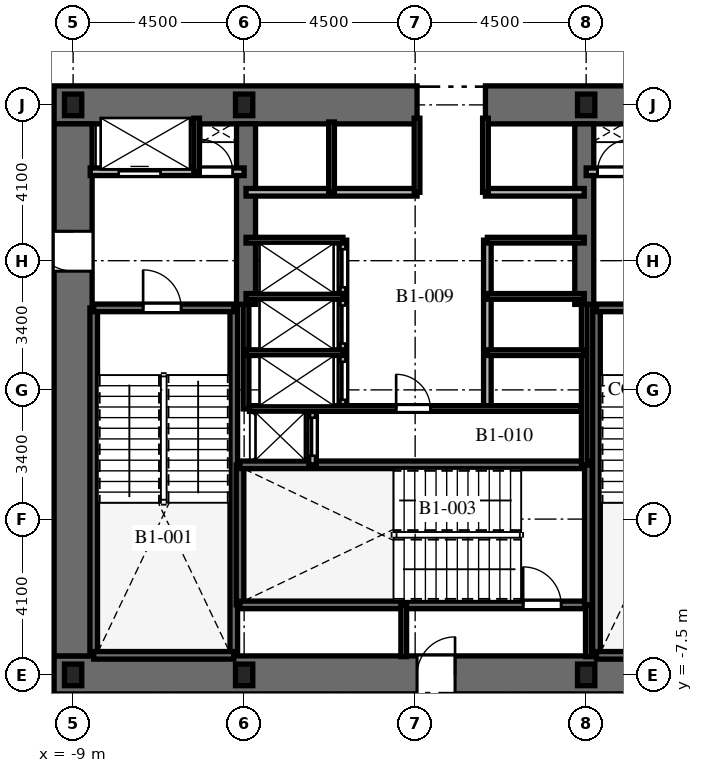
"""IFC4 building model, lengths in metres.
Left out: names, types, materials, properties, quantities, classifications, styles, units other than length and angle.
Written with IfcOpenShell. Run it as: python <this file> out.ifc"""

import sys

from ifc_helpers import new_model, si_unit, direction, frame, frame_2d, origin, origin_2d, place, context, subcontext, project, spatial, rectangle, i_section, extrude, element, fill, save


model = new_model("IFC4")
c1 = context("Model", 3, precision=1e-05, world=origin(), true_north=direction((0.0, 1.0)))
c2 = subcontext(c1, "Body", "Model", "MODEL_VIEW")
j1 = project(units=[si_unit("LENGTHUNIT", "METRE"), si_unit("PLANEANGLEUNIT", "RADIAN")], contexts=[c1])
p1 = place(None, origin())
s1 = spatial("IfcSite", under=j1, at=p1, CompositionType="ELEMENT")
p2 = place(p1, origin())
s2 = spatial("IfcBuilding", under=s1, at=p2, CompositionType="ELEMENT")
p3 = place(p2, frame((0.0, 0.0, -4.5)))
s3 = spatial("IfcBuildingStorey", under=s2, at=p3, CompositionType="ELEMENT", Elevation=-4.5)
p4 = place(p3, frame((-9.5, -7.5, 0.0), z_axis=(0.0, 0.0, 1.0), x_axis=(1.0, 0.0, 0.0)))
e1 = element("IfcWall", 1, at=p4, inside=s3, PredefinedType="SHEAR", context=c2, shape_type="SweptSolid", body=[
    extrude(rectangle(XDim=19.0, YDim=1.0, at=frame_2d((9.5, 0.0))), origin(), (0.0, 0.0, 1.0), 4.5),
])
p5 = place(p4, frame((9.55, 0.0, 0.0)))
e2 = element("IfcOpeningElement", 2, at=p5, cuts=e1, PredefinedType="OPENING", context=c2, shape_type="SweptSolid", body=[
    extrude(rectangle(XDim=1.0, YDim=2.15, at=frame_2d((0.5, 1.075))), frame((0.0, 0.51, 0.0), z_axis=(0.0, -1.0, 0.0), x_axis=(1.0, 0.0, 0.0)), (0.0, 0.0, 1.0), 1.02),
])
p6 = place(p3, frame((-9.5, 7.5, 0.0), z_axis=(0.0, 0.0, 1.0), x_axis=(1.0, 0.0, 0.0)))
e3 = element("IfcWall", 3, at=p6, inside=s3, PredefinedType="SHEAR", context=c2, shape_type="SweptSolid", body=[
    extrude(rectangle(XDim=9.55, YDim=1.0, at=frame_2d((4.775, 0.0))), origin(), (0.0, 0.0, 1.0), 4.5),
])
p7 = place(p3, frame((1.85, 7.5, 0.0), z_axis=(0.0, 0.0, 1.0), x_axis=(1.0, 0.0, 0.0)))
e4 = element("IfcWall", 4, at=p7, inside=s3, PredefinedType="SHEAR", context=c2, shape_type="SweptSolid", body=[
    extrude(rectangle(XDim=7.65, YDim=1.0, at=frame_2d((3.825, 0.0))), origin(), (0.0, 0.0, 1.0), 4.5),
])
p8 = place(p3, frame((-9.0, -7.0, 0.0), z_axis=(0.0, 0.0, 1.0), x_axis=(0.0, 1.0, 0.0)))
e5 = element("IfcWall", 5, at=p8, inside=s3, PredefinedType="SHEAR", context=c2, shape_type="SweptSolid", body=[
    extrude(rectangle(XDim=14.0, YDim=1.0, at=frame_2d((7.0, 0.0))), origin(), (0.0, 0.0, 1.0), 4.5),
])
p9 = place(p8, frame((10.125, 0.0, 0.0)))
e6 = element("IfcOpeningElement", 6, at=p9, cuts=e5, PredefinedType="OPENING", context=c2, shape_type="SweptSolid", body=[
    extrude(rectangle(XDim=1.05, YDim=2.15, at=frame_2d((0.525, 1.075))), frame((0.0, 0.51, 0.0), z_axis=(0.0, -1.0, 0.0), x_axis=(1.0, 0.0, 0.0)), (0.0, 0.0, 1.0), 1.02),
])
for number, where, z_axis, x_axis in (
    (7, (-4.45, 2.25, 0.0), (0.0, 0.0, 1.0), (0.0, 1.0, 0.0)),
    (8, (4.45, 2.25, 0.0), (0.0, 0.0, 1.0), (0.0, 1.0, 0.0)),
):
    element("IfcWall", number, at=place(p3, frame(where, z_axis=z_axis, x_axis=x_axis)), inside=s3, PredefinedType="SHEAR", context=c2, shape_type="SweptSolid", body=[
        extrude(rectangle(XDim=4.75, YDim=0.5, at=frame_2d((2.375, 0.0))), origin(), (0.0, 0.0, 1.0), 4.5),
    ])
for number, where, z_axis, x_axis in (
    (9, (-8.458, -6.985, 0.0), (0.0, 0.0, 1.0), (0.0, 1.0, 0.0)),
    (10, (-4.772, -6.985, 0.0), (0.0, 0.0, 1.0), (0.0, 1.0, 0.0)),
):
    element("IfcWall", number, at=place(p3, frame(where, z_axis=z_axis, x_axis=x_axis)), inside=s3, PredefinedType="SHEAR", context=c2, shape_type="SweptSolid", body=[
        extrude(rectangle(XDim=9.143, YDim=0.2, at=frame_2d((4.572, 0.0))), origin(), (0.0, 0.0, 1.0), 4.5),
    ])
p10 = place(p3, frame((-8.458, -6.985, 0.0), z_axis=(0.0, 0.0, 1.0), x_axis=(1.0, 0.0, 0.0)))
e11 = element("IfcWall", 11, at=p10, inside=s3, PredefinedType="SHEAR", context=c2, shape_type="SweptSolid", body=[
    extrude(rectangle(XDim=3.686, YDim=0.2, at=frame_2d((1.843, 0.0))), origin(), (0.0, 0.0, 1.0), 4.5),
])
p11 = place(p3, frame((-8.458, 2.158, 0.0), z_axis=(0.0, 0.0, 1.0), x_axis=(1.0, 0.0, 0.0)))
e12 = element("IfcWall", 12, at=p11, inside=s3, PredefinedType="SHEAR", context=c2, shape_type="SweptSolid", body=[
    extrude(rectangle(XDim=3.686, YDim=0.2, at=frame_2d((1.843, 0.0))), origin(), (0.0, 0.0, 1.0), 4.5),
])
p12 = place(p11, frame((1.3, 0.0, 0.0)))
e13 = element("IfcOpeningElement", 13, at=p12, cuts=e12, PredefinedType="OPENING", context=c2, shape_type="SweptSolid", body=[
    extrude(rectangle(XDim=1.0, YDim=2.15, at=frame_2d((0.5, 1.075))), frame((0.0, 0.11, 0.0), z_axis=(0.0, -1.0, 0.0), x_axis=(1.0, 0.0, 0.0)), (0.0, 0.0, 1.0), 0.22),
])
p13 = place(p3, frame((4.772, -6.985, 0.0), z_axis=(0.0, 0.0, 1.0), x_axis=(0.0, 1.0, 0.0)))
e14 = element("IfcWall", 14, at=p13, inside=s3, PredefinedType="SHEAR", context=c2, shape_type="SweptSolid", body=[
    extrude(rectangle(XDim=9.143, YDim=0.2, at=frame_2d((4.572, 0.0))), origin(), (0.0, 0.0, 1.0), 4.5),
])
p14 = place(p3, frame((4.772, -6.985, 0.0), z_axis=(0.0, 0.0, 1.0), x_axis=(1.0, 0.0, 0.0)))
e15 = element("IfcWall", 15, at=p14, inside=s3, PredefinedType="SHEAR", context=c2, shape_type="SweptSolid", body=[
    extrude(rectangle(XDim=3.686, YDim=0.2, at=frame_2d((1.843, 0.0))), origin(), (0.0, 0.0, 1.0), 4.5),
])
p15 = place(p3, frame((4.772, 2.158, 0.0), z_axis=(0.0, 0.0, 1.0), x_axis=(1.0, 0.0, 0.0)))
e16 = element("IfcWall", 16, at=p15, inside=s3, PredefinedType="SHEAR", context=c2, shape_type="SweptSolid", body=[
    extrude(rectangle(XDim=3.686, YDim=0.2, at=frame_2d((1.843, 0.0))), origin(), (0.0, 0.0, 1.0), 4.5),
])
p16 = place(p15, frame((1.35, 0.0, 0.0)))
e17 = element("IfcOpeningElement", 17, at=p16, cuts=e16, PredefinedType="OPENING", context=c2, shape_type="SweptSolid", body=[
    extrude(rectangle(XDim=1.0, YDim=2.15, at=frame_2d((0.5, 1.075))), frame((0.0, 0.11, 0.0), z_axis=(0.0, -1.0, 0.0), x_axis=(1.0, 0.0, 0.0)), (0.0, 0.0, 1.0), 0.22),
])
p17 = place(p3, frame((-4.608, -5.658, 0.0), z_axis=(0.0, 0.0, 1.0), x_axis=(0.0, 1.0, 0.0)))
e18 = element("IfcWall", 18, at=p17, inside=s3, PredefinedType="SHEAR", context=c2, shape_type="SweptSolid", body=[
    extrude(rectangle(XDim=3.686, YDim=0.2, at=frame_2d((1.843, 0.0))), origin(), (0.0, 0.0, 1.0), 4.5),
])
p18 = place(p3, frame((-4.608, -5.658, 0.0), z_axis=(0.0, 0.0, 1.0), x_axis=(1.0, 0.0, 0.0)))
e19 = element("IfcWall", 19, at=p18, inside=s3, PredefinedType="SHEAR", context=c2, shape_type="SweptSolid", body=[
    extrude(rectangle(XDim=9.166, YDim=0.2, at=frame_2d((4.583, 0.0))), origin(), (0.0, 0.0, 1.0), 4.5),
])
p19 = place(p18, frame((7.45, 0.0, 0.0)))
e20 = element("IfcOpeningElement", 20, at=p19, cuts=e19, PredefinedType="OPENING", context=c2, shape_type="SweptSolid", body=[
    extrude(rectangle(XDim=1.0, YDim=2.15, at=frame_2d((0.5, 1.075))), frame((0.0, 0.11, 0.0), z_axis=(0.0, -1.0, 0.0), x_axis=(1.0, 0.0, 0.0)), (0.0, 0.0, 1.0), 0.22),
])
p20 = place(p3, frame((-4.608, -1.972, 0.0), z_axis=(0.0, 0.0, 1.0), x_axis=(1.0, 0.0, 0.0)))
e21 = element("IfcWall", 21, at=p20, inside=s3, PredefinedType="SHEAR", context=c2, shape_type="SweptSolid", body=[
    extrude(rectangle(XDim=9.166, YDim=0.2, at=frame_2d((4.583, 0.0))), origin(), (0.0, 0.0, 1.0), 4.5),
])
p21 = place(p3, frame((4.558, -5.658, 0.0), z_axis=(0.0, 0.0, 1.0), x_axis=(0.0, 1.0, 0.0)))
e22 = element("IfcWall", 22, at=p21, inside=s3, PredefinedType="SHEAR", context=c2, shape_type="SweptSolid", body=[
    extrude(rectangle(XDim=3.686, YDim=0.2, at=frame_2d((1.843, 0.0))), origin(), (0.0, 0.0, 1.0), 4.5),
])
for number, where, z_axis, x_axis in (
    (23, (-9.0, -7.5, 0.0), (0.0, 0.0, 1.0), (1.0, 0.0, 0.0)),
    (24, (-4.5, -7.5, 0.0), (0.0, 0.0, 1.0), (1.0, 0.0, 0.0)),
    (25, (4.5, -7.5, 0.0), (0.0, 0.0, 1.0), (1.0, 0.0, 0.0)),
    (26, (4.5, 7.5, 0.0), (0.0, 0.0, 1.0), (1.0, 0.0, 0.0)),
    (27, (-4.5, 7.5, 0.0), (0.0, 0.0, 1.0), (1.0, 0.0, 0.0)),
    (28, (-9.0, 7.5, 0.0), (0.0, 0.0, 1.0), (1.0, 0.0, 0.0)),
):
    element("IfcColumn", number, at=place(p3, frame(where, z_axis=z_axis, x_axis=x_axis)), inside=s3, PredefinedType="COLUMN", context=c2, shape_type="SweptSolid", body=[
        extrude(i_section(OverallWidth=0.454, OverallDepth=0.569, WebThickness=0.078, FlangeThickness=0.125, at=origin_2d()), origin(), (0.0, 0.0, 1.0), 4.5),
    ])
for number, where, z_axis, x_axis in (
    (29, (-0.3, -7.02, 0.0), (0.0, 0.0, 1.0), (0.0, 1.0, 0.0)),
    (30, (4.558, -7.02, 0.0), (0.0, 0.0, 1.0), (0.0, 1.0, 0.0)),
):
    element("IfcWall", number, at=place(p3, frame(where, z_axis=z_axis, x_axis=x_axis)), inside=s3, PredefinedType="PARTITIONING", context=c2, shape_type="SweptSolid", body=[
        extrude(rectangle(XDim=1.362, YDim=0.15, at=frame_2d((0.681, 0.0))), origin(), (0.0, 0.0, 1.0), 4.18),
    ])
p22 = place(p3, frame((-8.55, 5.74, 0.0), z_axis=(0.0, 0.0, 1.0), x_axis=(1.0, 0.0, 0.0)))
e31 = element("IfcWall", 31, at=p22, inside=s3, PredefinedType="PARTITIONING", context=c2, shape_type="SweptSolid", body=[
    extrude(rectangle(XDim=4.05, YDim=0.2, at=frame_2d((2.025, 0.0))), origin(), (0.0, 0.0, 1.0), 4.18),
])
p23 = place(p22, frame((0.75, 0.0, 0.0)))
e32 = element("IfcOpeningElement", 32, at=p23, cuts=e31, PredefinedType="OPENING", context=c2, shape_type="SweptSolid", body=[
    extrude(rectangle(XDim=1.1, YDim=2.2, at=frame_2d((0.55, 1.1))), frame((0.0, 0.11, 0.0), z_axis=(0.0, -1.0, 0.0), x_axis=(1.0, 0.0, 0.0)), (0.0, 0.0, 1.0), 0.22),
])
p24 = place(p22, frame((2.9, 0.0, 0.0)))
e33 = element("IfcOpeningElement", 33, at=p24, cuts=e31, PredefinedType="OPENING", context=c2, shape_type="SweptSolid", body=[
    extrude(rectangle(XDim=0.85, YDim=2.03, at=frame_2d((0.425, 1.015))), frame((0.0, 0.11, 0.0), z_axis=(0.0, -1.0, 0.0), x_axis=(1.0, 0.0, 0.0)), (0.0, 0.0, 1.0), 0.22),
])
p25 = place(p3, frame((-5.75, 5.74, 0.0), z_axis=(0.0, 0.0, 1.0), x_axis=(0.0, 1.0, 0.0)))
e34 = element("IfcWall", 34, at=p25, inside=s3, PredefinedType="PARTITIONING", context=c2, shape_type="SweptSolid", body=[
    extrude(rectangle(XDim=1.41, YDim=0.15, at=frame_2d((0.705, 0.0))), origin(), (0.0, 0.0, 1.0), 4.18),
])
p26 = place(p3, frame((4.5, 5.74, 0.0), z_axis=(0.0, 0.0, 1.0), x_axis=(1.0, 0.0, 0.0)))
e35 = element("IfcWall", 35, at=p26, inside=s3, PredefinedType="PARTITIONING", context=c2, shape_type="SweptSolid", body=[
    extrude(rectangle(XDim=4.05, YDim=0.2, at=frame_2d((2.025, 0.0))), origin(), (0.0, 0.0, 1.0), 4.18),
])
p27 = place(p26, frame((0.3, 0.0, 0.0)))
e36 = element("IfcOpeningElement", 36, at=p27, cuts=e35, PredefinedType="OPENING", context=c2, shape_type="SweptSolid", body=[
    extrude(rectangle(XDim=0.85, YDim=2.03, at=frame_2d((0.425, 1.015))), frame((0.0, 0.11, 0.0), z_axis=(0.0, -1.0, 0.0), x_axis=(1.0, 0.0, 0.0)), (0.0, 0.0, 1.0), 0.22),
])
p28 = place(p26, frame((2.15, 0.0, 0.0)))
e37 = element("IfcOpeningElement", 37, at=p28, cuts=e35, PredefinedType="OPENING", context=c2, shape_type="SweptSolid", body=[
    extrude(rectangle(XDim=1.1, YDim=2.2, at=frame_2d((0.55, 1.1))), frame((0.0, 0.11, 0.0), z_axis=(0.0, -1.0, 0.0), x_axis=(1.0, 0.0, 0.0)), (0.0, 0.0, 1.0), 0.22),
])
p29 = place(p3, frame((-2.7, -1.972, 0.0), z_axis=(0.0, 0.0, 1.0), x_axis=(0.0, 1.0, 0.0)))
e38 = element("IfcWall", 38, at=p29, inside=s3, PredefinedType="PARTITIONING", context=c2, shape_type="SweptSolid", body=[
    extrude(rectangle(XDim=1.472, YDim=0.2, at=frame_2d((0.736, 0.0))), origin(), (0.0, 0.0, 1.0), 4.18),
])
p30 = place(p29, frame((0.24, 0.0, 0.0)))
e39 = element("IfcOpeningElement", 39, at=p30, cuts=e38, PredefinedType="OPENING", context=c2, shape_type="SweptSolid", body=[
    extrude(rectangle(XDim=1.0, YDim=2.2, at=frame_2d((0.5, 1.1))), frame((0.0, 0.11, 0.0), z_axis=(0.0, -1.0, 0.0), x_axis=(1.0, 0.0, 0.0)), (0.0, 0.0, 1.0), 0.22),
])
p31 = place(p3, frame((-4.45, 5.2, 0.0), z_axis=(0.0, 0.0, 1.0), x_axis=(1.0, 0.0, 0.0)))
e40 = element("IfcWall", 40, at=p31, inside=s3, PredefinedType="PARTITIONING", context=c2, shape_type="SweptSolid", body=[
    extrude(rectangle(XDim=4.5, YDim=0.2, at=frame_2d((2.25, 0.0))), origin(), (0.0, 0.0, 1.0), 4.18),
])
p32 = place(p3, frame((1.85, 5.2, 0.0), z_axis=(0.0, 0.0, 1.0), x_axis=(1.0, 0.0, 0.0)))
e41 = element("IfcWall", 41, at=p32, inside=s3, PredefinedType="PARTITIONING", context=c2, shape_type="SweptSolid", body=[
    extrude(rectangle(XDim=2.6, YDim=0.2, at=frame_2d((1.3, 0.0))), origin(), (0.0, 0.0, 1.0), 4.18),
])
p33 = place(p3, frame((-2.2, 5.2, 0.0), z_axis=(0.0, 0.0, 1.0), x_axis=(0.0, 1.0, 0.0)))
e42 = element("IfcWall", 42, at=p33, inside=s3, PredefinedType="PARTITIONING", context=c2, shape_type="SweptSolid", body=[
    extrude(rectangle(XDim=1.85, YDim=0.15, at=frame_2d((0.925, 0.0))), origin(), (0.0, 0.0, 1.0), 4.18),
])
for number, where, z_axis, x_axis in (
    (43, (0.05, 5.2, 0.0), (0.0, 0.0, 1.0), (0.0, 1.0, 0.0)),
    (44, (1.85, 5.2, 0.0), (0.0, 0.0, 1.0), (0.0, 1.0, 0.0)),
):
    element("IfcWall", number, at=place(p3, frame(where, z_axis=z_axis, x_axis=x_axis)), inside=s3, PredefinedType="PARTITIONING", context=c2, shape_type="SweptSolid", body=[
        extrude(rectangle(XDim=1.95, YDim=0.15, at=frame_2d((0.975, 0.0))), origin(), (0.0, 0.0, 1.0), 4.18),
    ])
p34 = place(p3, frame((-4.45, -0.5, 0.0), z_axis=(0.0, 0.0, 1.0), x_axis=(0.0, 1.0, 0.0)))
e45 = element("IfcWall", 45, at=p34, inside=s3, PredefinedType="PARTITIONING", context=c2, shape_type="SweptSolid", body=[
    extrude(rectangle(XDim=2.75, YDim=0.15, at=frame_2d((1.375, 0.0))), origin(), (0.0, 0.0, 1.0), 4.18),
])
p35 = place(p3, frame((4.45, -1.972, 0.0), z_axis=(0.0, 0.0, 1.0), x_axis=(0.0, 1.0, 0.0)))
e46 = element("IfcWall", 46, at=p35, inside=s3, PredefinedType="PARTITIONING", context=c2, shape_type="SweptSolid", body=[
    extrude(rectangle(XDim=4.222, YDim=0.15, at=frame_2d((2.111, 0.0))), origin(), (0.0, 0.0, 1.0), 4.18),
])
p36 = place(p3, frame((-1.9, -0.5, 0.0), z_axis=(0.0, 0.0, 1.0), x_axis=(0.0, 1.0, 0.0)))
e47 = element("IfcWall", 47, at=p36, inside=s3, PredefinedType="PARTITIONING", context=c2, shape_type="SweptSolid", body=[
    extrude(rectangle(XDim=4.44, YDim=0.2, at=frame_2d((2.22, 0.0))), origin(), (0.0, 0.0, 1.0), 4.18),
])
p37 = place(p36, frame((0.24, 0.0, 0.0)))
e48 = element("IfcOpeningElement", 48, at=p37, cuts=e47, PredefinedType="OPENING", context=c2, shape_type="SweptSolid", body=[
    extrude(rectangle(XDim=1.0, YDim=2.2, at=frame_2d((0.5, 1.1))), frame((0.0, 0.11, 0.0), z_axis=(0.0, -1.0, 0.0), x_axis=(1.0, 0.0, 0.0)), (0.0, 0.0, 1.0), 0.22),
])
p38 = place(p36, frame((1.72, 0.0, 0.0)))
e49 = element("IfcOpeningElement", 49, at=p38, cuts=e47, PredefinedType="OPENING", context=c2, shape_type="SweptSolid", body=[
    extrude(rectangle(XDim=1.0, YDim=2.2, at=frame_2d((0.5, 1.1))), frame((0.0, 0.11, 0.0), z_axis=(0.0, -1.0, 0.0), x_axis=(1.0, 0.0, 0.0)), (0.0, 0.0, 1.0), 0.22),
])
p39 = place(p36, frame((3.2, 0.0, 0.0)))
e50 = element("IfcOpeningElement", 50, at=p39, cuts=e47, PredefinedType="OPENING", context=c2, shape_type="SweptSolid", body=[
    extrude(rectangle(XDim=1.0, YDim=2.2, at=frame_2d((0.5, 1.1))), frame((0.0, 0.11, 0.0), z_axis=(0.0, -1.0, 0.0), x_axis=(1.0, 0.0, 0.0)), (0.0, 0.0, 1.0), 0.22),
])
for number, where, z_axis, x_axis in (
    (51, (-4.45, 3.94, 0.0), (0.0, 0.0, 1.0), (1.0, 0.0, 0.0)),
    (52, (-4.45, 0.98, 0.0), (0.0, 0.0, 1.0), (1.0, 0.0, 0.0)),
    (53, (-4.45, 2.46, 0.0), (0.0, 0.0, 1.0), (1.0, 0.0, 0.0)),
):
    element("IfcWall", number, at=place(p3, frame(where, z_axis=z_axis, x_axis=x_axis)), inside=s3, PredefinedType="PARTITIONING", context=c2, shape_type="SweptSolid", body=[
        extrude(rectangle(XDim=2.55, YDim=0.15, at=frame_2d((1.275, 0.0))), origin(), (0.0, 0.0, 1.0), 4.18),
    ])
p40 = place(p3, frame((1.9, -0.5, 0.0), z_axis=(0.0, 0.0, 1.0), x_axis=(0.0, 1.0, 0.0)))
e54 = element("IfcWall", 54, at=p40, inside=s3, PredefinedType="PARTITIONING", context=c2, shape_type="SweptSolid", body=[
    extrude(rectangle(XDim=4.44, YDim=0.2, at=frame_2d((2.22, 0.0))), origin(), (0.0, 0.0, 1.0), 4.18),
])
for number, where, z_axis, x_axis in (
    (55, (1.9, 3.94, 0.0), (0.0, 0.0, 1.0), (1.0, 0.0, 0.0)),
    (56, (1.9, 0.98, 0.0), (0.0, 0.0, 1.0), (1.0, 0.0, 0.0)),
    (57, (1.9, 2.46, 0.0), (0.0, 0.0, 1.0), (1.0, 0.0, 0.0)),
):
    element("IfcWall", number, at=place(p3, frame(where, z_axis=z_axis, x_axis=x_axis)), inside=s3, PredefinedType="PARTITIONING", context=c2, shape_type="SweptSolid", body=[
        extrude(rectangle(XDim=2.55, YDim=0.15, at=frame_2d((1.275, 0.0))), origin(), (0.0, 0.0, 1.0), 4.18),
    ])
p41 = place(p3, frame((-4.36, -0.49, 0.0), z_axis=(0.0, 0.0, 1.0), x_axis=(1.0, 0.0, 0.0)))
e58 = element("IfcWall", 58, at=p41, inside=s3, PredefinedType="PARTITIONING", context=c2, shape_type="SweptSolid", body=[
    extrude(rectangle(XDim=8.72, YDim=0.15, at=frame_2d((4.36, 0.0))), origin(), (0.0, 0.0, 1.0), 4.18),
])
p42 = place(p41, frame((3.86, 0.0, 0.0)))
e59 = element("IfcOpeningElement", 59, at=p42, cuts=e58, PredefinedType="OPENING", context=c2, shape_type="SweptSolid", body=[
    extrude(rectangle(XDim=0.9, YDim=2.03, at=frame_2d((0.45, 1.015))), frame((0.0, 0.085, 0.0), z_axis=(0.0, -1.0, 0.0), x_axis=(1.0, 0.0, 0.0)), (0.0, 0.0, 1.0), 0.17),
])
p43 = place(p12, origin())
e60 = element("IfcDoor", 60, at=p43, inside=s3, OperationType="SINGLE_SWING_LEFT", PredefinedType="DOOR", context=c2, shape_type="SweptSolid", body=[
    extrude(rectangle(XDim=1.0, YDim=2.15, at=frame_2d((0.5, 1.075))), frame((0.0, 0.025, 0.0), z_axis=(0.0, -1.0, 0.0), x_axis=(1.0, 0.0, 0.0)), (0.0, 0.0, 1.0), 0.05),
])
fill(e13, e60)
p44 = place(p19, origin())
e61 = element("IfcDoor", 61, at=p44, inside=s3, OperationType="SINGLE_SWING_LEFT", PredefinedType="DOOR", context=c2, shape_type="SweptSolid", body=[
    extrude(rectangle(XDim=1.0, YDim=2.15, at=frame_2d((0.5, 1.075))), frame((0.0, 0.025, 0.0), z_axis=(0.0, -1.0, 0.0), x_axis=(1.0, 0.0, 0.0)), (0.0, 0.0, 1.0), 0.05),
])
fill(e20, e61)
p45 = place(p5, origin())
e62 = element("IfcDoor", 62, at=p45, inside=s3, OperationType="SINGLE_SWING_RIGHT", PredefinedType="DOOR", context=c2, shape_type="SweptSolid", body=[
    extrude(rectangle(XDim=1.0, YDim=2.15, at=frame_2d((0.5, 1.075))), frame((0.0, 0.025, 0.0), z_axis=(0.0, -1.0, 0.0), x_axis=(1.0, 0.0, 0.0)), (0.0, 0.0, 1.0), 0.05),
])
fill(e2, e62)
p46 = place(p9, origin())
e63 = element("IfcDoor", 63, at=p46, inside=s3, OperationType="SINGLE_SWING_RIGHT", PredefinedType="DOOR", context=c2, shape_type="SweptSolid", body=[
    extrude(rectangle(XDim=1.05, YDim=2.15, at=frame_2d((0.525, 1.075))), frame((0.0, 0.025, 0.0), z_axis=(0.0, -1.0, 0.0), x_axis=(1.0, 0.0, 0.0)), (0.0, 0.0, 1.0), 0.05),
])
fill(e6, e63)
p47 = place(p23, origin())
e64 = element("IfcDoor", 64, at=p47, inside=s3, OperationType="SLIDING_TO_LEFT", PredefinedType="DOOR", context=c2, shape_type="SweptSolid", body=[
    extrude(rectangle(XDim=1.1, YDim=2.2, at=frame_2d((0.55, 1.1))), frame((0.0, 0.025, 0.0), z_axis=(0.0, -1.0, 0.0), x_axis=(1.0, 0.0, 0.0)), (0.0, 0.0, 1.0), 0.05),
])
fill(e32, e64)
p48 = place(p24, origin())
e65 = element("IfcDoor", 65, at=p48, inside=s3, OperationType="SINGLE_SWING_LEFT", PredefinedType="DOOR", context=c2, shape_type="SweptSolid", body=[
    extrude(rectangle(XDim=0.85, YDim=2.03, at=frame_2d((0.425, 1.015))), frame((0.0, 0.025, 0.0), z_axis=(0.0, -1.0, 0.0), x_axis=(1.0, 0.0, 0.0)), (0.0, 0.0, 1.0), 0.05),
])
fill(e33, e65)
p49 = place(p27, origin())
e66 = element("IfcDoor", 66, at=p49, inside=s3, OperationType="SINGLE_SWING_RIGHT", PredefinedType="DOOR", context=c2, shape_type="SweptSolid", body=[
    extrude(rectangle(XDim=0.85, YDim=2.03, at=frame_2d((0.425, 1.015))), frame((0.0, 0.025, 0.0), z_axis=(0.0, -1.0, 0.0), x_axis=(1.0, 0.0, 0.0)), (0.0, 0.0, 1.0), 0.05),
])
fill(e36, e66)
p50 = place(p30, origin())
e67 = element("IfcDoor", 67, at=p50, inside=s3, OperationType="SLIDING_TO_LEFT", PredefinedType="DOOR", context=c2, shape_type="SweptSolid", body=[
    extrude(rectangle(XDim=1.0, YDim=2.2, at=frame_2d((0.5, 1.1))), frame((0.0, 0.025, 0.0), z_axis=(0.0, -1.0, 0.0), x_axis=(1.0, 0.0, 0.0)), (0.0, 0.0, 1.0), 0.05),
])
fill(e39, e67)
p51 = place(p37, origin())
e68 = element("IfcDoor", 68, at=p51, inside=s3, OperationType="SLIDING_TO_LEFT", PredefinedType="DOOR", context=c2, shape_type="SweptSolid", body=[
    extrude(rectangle(XDim=1.0, YDim=2.2, at=frame_2d((0.5, 1.1))), frame((0.0, 0.025, 0.0), z_axis=(0.0, -1.0, 0.0), x_axis=(1.0, 0.0, 0.0)), (0.0, 0.0, 1.0), 0.05),
])
fill(e48, e68)
p52 = place(p38, origin())
e69 = element("IfcDoor", 69, at=p52, inside=s3, OperationType="SLIDING_TO_LEFT", PredefinedType="DOOR", context=c2, shape_type="SweptSolid", body=[
    extrude(rectangle(XDim=1.0, YDim=2.2, at=frame_2d((0.5, 1.1))), frame((0.0, 0.025, 0.0), z_axis=(0.0, -1.0, 0.0), x_axis=(1.0, 0.0, 0.0)), (0.0, 0.0, 1.0), 0.05),
])
fill(e49, e69)
p53 = place(p39, origin())
e70 = element("IfcDoor", 70, at=p53, inside=s3, OperationType="SLIDING_TO_LEFT", PredefinedType="DOOR", context=c2, shape_type="SweptSolid", body=[
    extrude(rectangle(XDim=1.0, YDim=2.2, at=frame_2d((0.5, 1.1))), frame((0.0, 0.025, 0.0), z_axis=(0.0, -1.0, 0.0), x_axis=(1.0, 0.0, 0.0)), (0.0, 0.0, 1.0), 0.05),
])
fill(e50, e70)
p54 = place(p42, origin())
e71 = element("IfcDoor", 71, at=p54, inside=s3, OperationType="SINGLE_SWING_LEFT", PredefinedType="DOOR", context=c2, shape_type="SweptSolid", body=[
    extrude(rectangle(XDim=0.9, YDim=2.03, at=frame_2d((0.45, 1.015))), frame((0.0, 0.025, 0.0), z_axis=(0.0, -1.0, 0.0), x_axis=(1.0, 0.0, 0.0)), (0.0, 0.0, 1.0), 0.05),
])
fill(e59, e71)
save(model, sys.argv[1])
